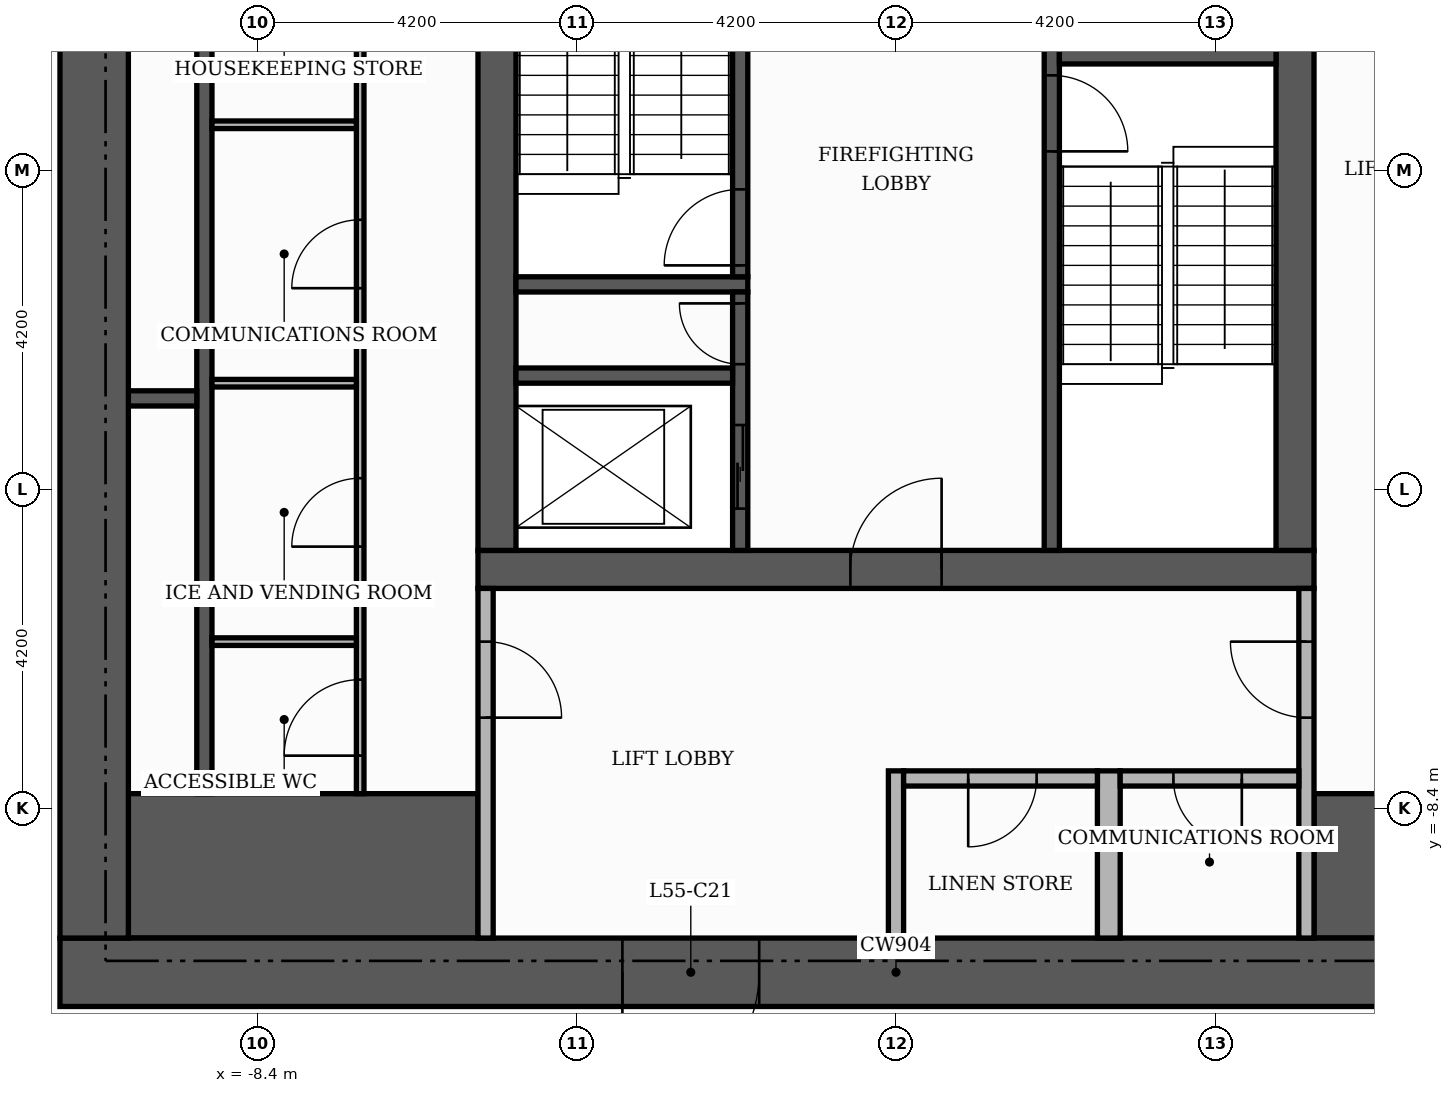
"""IFC4 building model, lengths in metres.
Left out: names, types, materials, properties, quantities, classifications, styles, units other than length and angle.
Written with IfcOpenShell. Run it as: python <this file> out.ifc"""

import sys

from ifc_helpers import new_model, si_unit, direction, frame, frame_2d, origin, place, context, subcontext, project, spatial, rectangle, extrude, element, fill, save


model = new_model("IFC4")
c1 = context("Model", 3, precision=1e-05, world=origin(), true_north=direction((0.0, 1.0)))
c2 = subcontext(c1, "Body", "Model", "MODEL_VIEW")
j1 = project(units=[si_unit("LENGTHUNIT", "METRE"), si_unit("PLANEANGLEUNIT", "RADIAN")], contexts=[c1])
p1 = place(None, origin())
s1 = spatial("IfcSite", under=j1, at=p1, CompositionType="ELEMENT")
p2 = place(p1, origin())
s2 = spatial("IfcBuilding", under=s1, at=p2, CompositionType="ELEMENT")
p3 = place(p2, frame((0.0, 0.0, 231.3)))
s3 = spatial("IfcBuildingStorey", under=s2, at=p3, CompositionType="ELEMENT", Elevation=231.3)
p4 = place(p3, frame((-5.5, -5.25, 0.0), z_axis=(0.0, 0.0, 1.0), x_axis=(1.0, 0.0, 0.0)))
e1 = element("IfcWall", 1, at=p4, inside=s3, PredefinedType="SHEAR", context=c2, shape_type="SweptSolid", body=[
    extrude(rectangle(XDim=11.0, YDim=0.5, at=frame_2d((5.5, 0.0))), origin(), (0.0, 0.0, 1.0), 3.4),
])
p5 = place(p4, frame((4.9, 0.0, 0.0)))
e2 = element("IfcOpeningElement", 2, at=p5, cuts=e1, PredefinedType="OPENING", context=c2, shape_type="SweptSolid", body=[
    extrude(rectangle(XDim=1.2, YDim=2.1, at=frame_2d((0.6, 1.05))), frame((0.0, 0.26, 0.0), z_axis=(0.0, -1.0, 0.0), x_axis=(1.0, 0.0, 0.0)), (0.0, 0.0, 1.0), 0.52),
])
for number, where, z_axis, x_axis in (
    (3, (-5.25, -5.0, 0.0), (0.0, 0.0, 1.0), (0.0, 1.0, 0.0)),
    (4, (5.25, -5.0, 0.0), (0.0, 0.0, 1.0), (0.0, 1.0, 0.0)),
):
    element("IfcWall", number, at=place(p3, frame(where, z_axis=z_axis, x_axis=x_axis)), inside=s3, PredefinedType="SHEAR", context=c2, shape_type="SweptSolid", body=[
        extrude(rectangle(XDim=10.5, YDim=0.5, at=frame_2d((5.25, 0.0))), origin(), (0.0, 0.0, 1.0), 3.4),
    ])
for number, where, z_axis, x_axis in (
    (5, (-10.1, -9.15, 0.0), (0.0, 0.0, 1.0), (1.0, 0.0, 0.0)),
    (6, (5.5, -9.15, 0.0), (0.0, 0.0, 1.0), (1.0, 0.0, 0.0)),
):
    element("IfcWall", number, at=place(p3, frame(where, z_axis=z_axis, x_axis=x_axis)), inside=s3, PredefinedType="SHEAR", context=c2, shape_type="SweptSolid", body=[
        extrude(rectangle(XDim=4.6, YDim=1.9, at=frame_2d((2.3, 0.0))), origin(), (0.0, 0.0, 1.0), 3.4),
    ])
p6 = place(p3, frame((2.05, -5.0, 0.0), z_axis=(0.0, 0.0, 1.0), x_axis=(0.0, 1.0, 0.0)))
e7 = element("IfcWall", 7, at=p6, inside=s3, PredefinedType="SHEAR", context=c2, shape_type="SweptSolid", body=[
    extrude(rectangle(XDim=6.6, YDim=0.2, at=frame_2d((3.3, 0.0))), origin(), (0.0, 0.0, 1.0), 3.4),
])
p7 = place(p6, frame((5.25, 0.0, 0.0)))
e8 = element("IfcOpeningElement", 8, at=p7, cuts=e7, PredefinedType="OPENING", context=c2, shape_type="SweptSolid", body=[
    extrude(rectangle(XDim=1.0, YDim=2.1, at=frame_2d((0.5, 1.05))), frame((0.0, 0.11, 0.0), z_axis=(0.0, -1.0, 0.0), x_axis=(1.0, 0.0, 0.0)), (0.0, 0.0, 1.0), 0.22),
])
p8 = place(p3, frame((-5.0, -1.5, 0.0), z_axis=(0.0, 0.0, 1.0), x_axis=(1.0, 0.0, 0.0)))
e9 = element("IfcWall", 9, at=p8, inside=s3, PredefinedType="SHEAR", context=c2, shape_type="SweptSolid", body=[
    extrude(rectangle(XDim=3.05, YDim=0.2, at=frame_2d((1.525, 0.0))), origin(), (0.0, 0.0, 1.0), 3.4),
])
p9 = place(p3, frame((-2.05, -1.4, 0.0), z_axis=(0.0, 0.0, 1.0), x_axis=(0.0, 1.0, 0.0)))
e10 = element("IfcWall", 10, at=p9, inside=s3, PredefinedType="SHEAR", context=c2, shape_type="SweptSolid", body=[
    extrude(rectangle(XDim=6.4, YDim=0.2, at=frame_2d((3.2, 0.0))), origin(), (0.0, 0.0, 1.0), 3.4),
])
p10 = place(p9, frame((0.15, 0.0, 0.0)))
e11 = element("IfcOpeningElement", 11, at=p10, cuts=e10, PredefinedType="OPENING", context=c2, shape_type="SweptSolid", body=[
    extrude(rectangle(XDim=1.0, YDim=2.1, at=frame_2d((0.5, 1.05))), frame((0.0, 0.11, 0.0), z_axis=(0.0, -1.0, 0.0), x_axis=(1.0, 0.0, 0.0)), (0.0, 0.0, 1.0), 0.22),
])
p11 = place(p3, frame((2.15, 1.5, 0.0), z_axis=(0.0, 0.0, 1.0), x_axis=(1.0, 0.0, 0.0)))
e12 = element("IfcWall", 12, at=p11, inside=s3, PredefinedType="SHEAR", context=c2, shape_type="SweptSolid", body=[
    extrude(rectangle(XDim=2.85, YDim=0.2, at=frame_2d((1.425, 0.0))), origin(), (0.0, 0.0, 1.0), 3.4),
])
p12 = place(p3, frame((-9.1, -8.2, 0.0), z_axis=(0.0, 0.0, 1.0), x_axis=(0.0, 1.0, 0.0)))
e13 = element("IfcWall", 13, at=p12, inside=s3, PredefinedType="SHEAR", context=c2, shape_type="SweptSolid", body=[
    extrude(rectangle(XDim=16.4, YDim=0.2, at=frame_2d((8.2, 0.0))), origin(), (0.0, 0.0, 1.0), 3.4),
])
p13 = place(p3, frame((-2.05, -5.0, 0.0), z_axis=(0.0, 0.0, 1.0), x_axis=(0.0, 1.0, 0.0)))
e14 = element("IfcWall", 14, at=p13, inside=s3, PredefinedType="SHEAR", context=c2, shape_type="SweptSolid", body=[
    extrude(rectangle(XDim=3.4, YDim=0.2, at=frame_2d((1.7, 0.0))), origin(), (0.0, 0.0, 1.0), 3.4),
])
p14 = place(p13, frame((0.55, 0.0, 0.0)))
e15 = element("IfcOpeningElement", 15, at=p14, cuts=e14, PredefinedType="OPENING", context=c2, shape_type="SweptSolid", body=[
    extrude(rectangle(XDim=1.1, YDim=2.1, at=frame_2d((0.55, 1.05))), frame((0.0, 0.11, 0.0), z_axis=(0.0, -1.0, 0.0), x_axis=(1.0, 0.0, 0.0)), (0.0, 0.0, 1.0), 0.22),
])
p15 = place(p13, frame((2.45, 0.0, 0.0)))
e16 = element("IfcOpeningElement", 16, at=p15, cuts=e14, PredefinedType="OPENING", context=c2, shape_type="SweptSolid", body=[
    extrude(rectangle(XDim=0.8, YDim=2.1, at=frame_2d((0.4, 1.05))), frame((0.0, 0.11, 0.0), z_axis=(0.0, -1.0, 0.0), x_axis=(1.0, 0.0, 0.0)), (0.0, 0.0, 1.0), 0.22),
])
p16 = place(p3, frame((-10.1, -3.0, 0.0), z_axis=(0.0, 0.0, 1.0), x_axis=(1.0, 0.0, 0.0)))
e17 = element("IfcWall", 17, at=p16, inside=s3, PredefinedType="SHEAR", context=c2, shape_type="SweptSolid", body=[
    extrude(rectangle(XDim=0.9, YDim=0.2, at=frame_2d((0.45, 0.0))), origin(), (0.0, 0.0, 1.0), 3.4),
])
p17 = place(p3, frame((-5.0, -2.7, 0.0), z_axis=(0.0, 0.0, 1.0), x_axis=(1.0, 0.0, 0.0)))
e18 = element("IfcWall", 18, at=p17, inside=s3, PredefinedType="SHEAR", context=c2, shape_type="SweptSolid", body=[
    extrude(rectangle(XDim=2.85, YDim=0.2, at=frame_2d((1.425, 0.0))), origin(), (0.0, 0.0, 1.0), 3.4),
])
p18 = place(p3, frame((-11.0, -10.55, 0.0), z_axis=(0.0, 0.0, 1.0), x_axis=(1.0, 0.0, 0.0)))
e19 = element("IfcWall", 19, at=p18, inside=s3, PredefinedType="SHEAR", context=c2, shape_type="SweptSolid", body=[
    extrude(rectangle(XDim=22.0, YDim=0.9, at=frame_2d((11.0, 0.0))), origin(), (0.0, 0.0, 1.0), 3.4),
])
p19 = place(p18, frame((7.4, 0.0, 0.0)))
e20 = element("IfcOpeningElement", 20, at=p19, cuts=e19, PredefinedType="OPENING", context=c2, shape_type="SweptSolid", body=[
    extrude(rectangle(XDim=1.8, YDim=2.2, at=frame_2d((0.9, 1.1))), frame((0.0, 0.46, 0.0), z_axis=(0.0, -1.0, 0.0), x_axis=(1.0, 0.0, 0.0)), (0.0, 0.0, 1.0), 0.92),
])
p20 = place(p3, frame((-10.55, -10.1, 0.0), z_axis=(0.0, 0.0, 1.0), x_axis=(0.0, 1.0, 0.0)))
e21 = element("IfcWall", 21, at=p20, inside=s3, PredefinedType="SHEAR", context=c2, shape_type="SweptSolid", body=[
    extrude(rectangle(XDim=20.2, YDim=0.9, at=frame_2d((10.1, 0.0))), origin(), (0.0, 0.0, 1.0), 3.4),
])
p21 = place(p3, frame((-5.4, -10.1, 0.0), z_axis=(0.0, 0.0, 1.0), x_axis=(0.0, 1.0, 0.0)))
e22 = element("IfcWall", 22, at=p21, inside=s3, PredefinedType="PARTITIONING", context=c2, shape_type="SweptSolid", body=[
    extrude(rectangle(XDim=4.6, YDim=0.2, at=frame_2d((2.3, 0.0))), origin(), (0.0, 0.0, 1.0), 3.4),
])
p22 = place(p21, frame((2.9, 0.0, 0.0)))
e23 = element("IfcOpeningElement", 23, at=p22, cuts=e22, PredefinedType="OPENING", context=c2, shape_type="SweptSolid", body=[
    extrude(rectangle(XDim=1.0, YDim=2.1, at=frame_2d((0.5, 1.05))), frame((0.0, 0.11, 0.0), z_axis=(0.0, -1.0, 0.0), x_axis=(1.0, 0.0, 0.0)), (0.0, 0.0, 1.0), 0.22),
])
p23 = place(p3, frame((0.0, -10.1, 0.0), z_axis=(0.0, 0.0, 1.0), x_axis=(0.0, 1.0, 0.0)))
e24 = element("IfcWall", 24, at=p23, inside=s3, PredefinedType="PARTITIONING", context=c2, shape_type="SweptSolid", body=[
    extrude(rectangle(XDim=2.2, YDim=0.2, at=frame_2d((1.1, 0.0))), origin(), (0.0, 0.0, 1.0), 3.4),
])
p24 = place(p3, frame((2.8, -10.1, 0.0), z_axis=(0.0, 0.0, 1.0), x_axis=(0.0, 1.0, 0.0)))
e25 = element("IfcWall", 25, at=p24, inside=s3, PredefinedType="PARTITIONING", context=c2, shape_type="SweptSolid", body=[
    extrude(rectangle(XDim=2.2, YDim=0.3, at=frame_2d((1.1, 0.0))), origin(), (0.0, 0.0, 1.0), 3.4),
])
p25 = place(p3, frame((5.4, -10.1, 0.0), z_axis=(0.0, 0.0, 1.0), x_axis=(0.0, 1.0, 0.0)))
e26 = element("IfcWall", 26, at=p25, inside=s3, PredefinedType="PARTITIONING", context=c2, shape_type="SweptSolid", body=[
    extrude(rectangle(XDim=4.6, YDim=0.2, at=frame_2d((2.3, 0.0))), origin(), (0.0, 0.0, 1.0), 3.4),
])
p26 = place(p25, frame((2.9, 0.0, 0.0)))
e27 = element("IfcOpeningElement", 27, at=p26, cuts=e26, PredefinedType="OPENING", context=c2, shape_type="SweptSolid", body=[
    extrude(rectangle(XDim=1.0, YDim=2.1, at=frame_2d((0.5, 1.05))), frame((0.0, 0.11, 0.0), z_axis=(0.0, -1.0, 0.0), x_axis=(1.0, 0.0, 0.0)), (0.0, 0.0, 1.0), 0.22),
])
p27 = place(p3, frame((-7.05, -8.2, 0.0), z_axis=(0.0, 0.0, 1.0), x_axis=(0.0, 1.0, 0.0)))
e28 = element("IfcWall", 28, at=p27, inside=s3, PredefinedType="PARTITIONING", context=c2, shape_type="SweptSolid", body=[
    extrude(rectangle(XDim=16.4, YDim=0.1, at=frame_2d((8.2, 0.0))), origin(), (0.0, 0.0, 1.0), 3.4),
])
p28 = place(p27, frame((0.5, 0.0, 0.0)))
e29 = element("IfcOpeningElement", 29, at=p28, cuts=e28, PredefinedType="OPENING", context=c2, shape_type="SweptSolid", body=[
    extrude(rectangle(XDim=1.0, YDim=2.1, at=frame_2d((0.5, 1.05))), frame((0.0, 0.06, 0.0), z_axis=(0.0, -1.0, 0.0), x_axis=(1.0, 0.0, 0.0)), (0.0, 0.0, 1.0), 0.12),
])
p29 = place(p27, frame((3.25, 0.0, 0.0)))
e30 = element("IfcOpeningElement", 30, at=p29, cuts=e28, PredefinedType="OPENING", context=c2, shape_type="SweptSolid", body=[
    extrude(rectangle(XDim=0.9, YDim=2.1, at=frame_2d((0.45, 1.05))), frame((0.0, 0.06, 0.0), z_axis=(0.0, -1.0, 0.0), x_axis=(1.0, 0.0, 0.0)), (0.0, 0.0, 1.0), 0.12),
])
p30 = place(p27, frame((6.65, 0.0, 0.0)))
e31 = element("IfcOpeningElement", 31, at=p30, cuts=e28, PredefinedType="OPENING", context=c2, shape_type="SweptSolid", body=[
    extrude(rectangle(XDim=0.9, YDim=2.1, at=frame_2d((0.45, 1.05))), frame((0.0, 0.06, 0.0), z_axis=(0.0, -1.0, 0.0), x_axis=(1.0, 0.0, 0.0)), (0.0, 0.0, 1.0), 0.12),
])
p31 = place(p27, frame((10.15, 0.0, 0.0)))
e32 = element("IfcOpeningElement", 32, at=p31, cuts=e28, PredefinedType="OPENING", context=c2, shape_type="SweptSolid", body=[
    extrude(rectangle(XDim=0.9, YDim=2.1, at=frame_2d((0.45, 1.05))), frame((0.0, 0.06, 0.0), z_axis=(0.0, -1.0, 0.0), x_axis=(1.0, 0.0, 0.0)), (0.0, 0.0, 1.0), 0.12),
])
p32 = place(p27, frame((12.95, 0.0, 0.0)))
e33 = element("IfcOpeningElement", 33, at=p32, cuts=e28, PredefinedType="OPENING", context=c2, shape_type="SweptSolid", body=[
    extrude(rectangle(XDim=0.9, YDim=2.1, at=frame_2d((0.45, 1.05))), frame((0.0, 0.06, 0.0), z_axis=(0.0, -1.0, 0.0), x_axis=(1.0, 0.0, 0.0)), (0.0, 0.0, 1.0), 0.12),
])
p33 = place(p27, frame((14.95, 0.0, 0.0)))
e34 = element("IfcOpeningElement", 34, at=p33, cuts=e28, PredefinedType="OPENING", context=c2, shape_type="SweptSolid", body=[
    extrude(rectangle(XDim=0.9, YDim=2.1, at=frame_2d((0.45, 1.05))), frame((0.0, 0.06, 0.0), z_axis=(0.0, -1.0, 0.0), x_axis=(1.0, 0.0, 0.0)), (0.0, 0.0, 1.0), 0.12),
])
p34 = place(p3, frame((0.1, -8.0, 0.0), z_axis=(0.0, 0.0, 1.0), x_axis=(1.0, 0.0, 0.0)))
e35 = element("IfcWall", 35, at=p34, inside=s3, PredefinedType="PARTITIONING", context=c2, shape_type="SweptSolid", body=[
    extrude(rectangle(XDim=2.55, YDim=0.2, at=frame_2d((1.275, 0.0))), origin(), (0.0, 0.0, 1.0), 3.4),
])
p35 = place(p34, frame((0.85, 0.0, 0.0)))
e36 = element("IfcOpeningElement", 36, at=p35, cuts=e35, PredefinedType="OPENING", context=c2, shape_type="SweptSolid", body=[
    extrude(rectangle(XDim=0.9, YDim=2.1, at=frame_2d((0.45, 1.05))), frame((0.0, 0.11, 0.0), z_axis=(0.0, -1.0, 0.0), x_axis=(1.0, 0.0, 0.0)), (0.0, 0.0, 1.0), 0.22),
])
p36 = place(p3, frame((2.95, -8.0, 0.0), z_axis=(0.0, 0.0, 1.0), x_axis=(1.0, 0.0, 0.0)))
e37 = element("IfcWall", 37, at=p36, inside=s3, PredefinedType="PARTITIONING", context=c2, shape_type="SweptSolid", body=[
    extrude(rectangle(XDim=2.35, YDim=0.2, at=frame_2d((1.175, 0.0))), origin(), (0.0, 0.0, 1.0), 3.4),
])
p37 = place(p36, frame((0.7, 0.0, 0.0)))
e38 = element("IfcOpeningElement", 38, at=p37, cuts=e37, PredefinedType="OPENING", context=c2, shape_type="SweptSolid", body=[
    extrude(rectangle(XDim=0.9, YDim=2.1, at=frame_2d((0.45, 1.05))), frame((0.0, 0.11, 0.0), z_axis=(0.0, -1.0, 0.0), x_axis=(1.0, 0.0, 0.0)), (0.0, 0.0, 1.0), 0.22),
])
for number, where, z_axis, x_axis in (
    (39, (-9.0, -6.2, 0.0), (0.0, 0.0, 1.0), (1.0, 0.0, 0.0)),
    (40, (-9.0, -2.8, 0.0), (0.0, 0.0, 1.0), (1.0, 0.0, 0.0)),
    (41, (-9.0, 0.6, 0.0), (0.0, 0.0, 1.0), (1.0, 0.0, 0.0)),
):
    element("IfcWall", number, at=place(p3, frame(where, z_axis=z_axis, x_axis=x_axis)), inside=s3, PredefinedType="PARTITIONING", context=c2, shape_type="SweptSolid", body=[
        extrude(rectangle(XDim=1.9, YDim=0.1, at=frame_2d((0.95, 0.0))), origin(), (0.0, 0.0, 1.0), 3.4),
    ])
p38 = place(p14, origin())
e42 = element("IfcDoor", 42, at=p38, inside=s3, OperationType="SLIDING_TO_LEFT", PredefinedType="DOOR", context=c2, shape_type="SweptSolid", body=[
    extrude(rectangle(XDim=1.1, YDim=2.1, at=frame_2d((0.55, 1.05))), frame((0.0, 0.025, 0.0), z_axis=(0.0, -1.0, 0.0), x_axis=(1.0, 0.0, 0.0)), (0.0, 0.0, 1.0), 0.05),
])
fill(e15, e42)
p39 = place(p10, origin())
e43 = element("IfcDoor", 43, at=p39, inside=s3, OperationType="SINGLE_SWING_LEFT", PredefinedType="DOOR", context=c2, shape_type="SweptSolid", body=[
    extrude(rectangle(XDim=1.0, YDim=2.1, at=frame_2d((0.5, 1.05))), frame((0.0, 0.025, 0.0), z_axis=(0.0, -1.0, 0.0), x_axis=(1.0, 0.0, 0.0)), (0.0, 0.0, 1.0), 0.05),
])
fill(e11, e43)
p40 = place(p7, frame((1.0, 0.0, 0.0), z_axis=(0.0, 0.0, 1.0), x_axis=(-1.0, 0.0, 0.0)))
e44 = element("IfcDoor", 44, at=p40, inside=s3, OperationType="SINGLE_SWING_LEFT", PredefinedType="DOOR", context=c2, shape_type="SweptSolid", body=[
    extrude(rectangle(XDim=1.0, YDim=2.1, at=frame_2d((0.5, 1.05))), frame((0.0, 0.025, 0.0), z_axis=(0.0, -1.0, 0.0), x_axis=(1.0, 0.0, 0.0)), (0.0, 0.0, 1.0), 0.05),
])
fill(e8, e44)
p41 = place(p15, origin())
e45 = element("IfcDoor", 45, at=p41, inside=s3, OperationType="SINGLE_SWING_RIGHT", PredefinedType="DOOR", context=c2, shape_type="SweptSolid", body=[
    extrude(rectangle(XDim=0.8, YDim=2.1, at=frame_2d((0.4, 1.05))), frame((0.0, 0.025, 0.0), z_axis=(0.0, -1.0, 0.0), x_axis=(1.0, 0.0, 0.0)), (0.0, 0.0, 1.0), 0.05),
])
fill(e16, e45)
p42 = place(p5, origin())
e46 = element("IfcDoor", 46, at=p42, inside=s3, OperationType="SINGLE_SWING_RIGHT", PredefinedType="DOOR", context=c2, shape_type="SweptSolid", body=[
    extrude(rectangle(XDim=1.2, YDim=2.1, at=frame_2d((0.6, 1.05))), frame((0.0, 0.025, 0.0), z_axis=(0.0, -1.0, 0.0), x_axis=(1.0, 0.0, 0.0)), (0.0, 0.0, 1.0), 0.05),
])
fill(e2, e46)
p43 = place(p22, frame((1.0, 0.0, 0.0), z_axis=(0.0, 0.0, 1.0), x_axis=(-1.0, 0.0, 0.0)))
e47 = element("IfcDoor", 47, at=p43, inside=s3, OperationType="SINGLE_SWING_LEFT", PredefinedType="DOOR", context=c2, shape_type="SweptSolid", body=[
    extrude(rectangle(XDim=1.0, YDim=2.1, at=frame_2d((0.5, 1.05))), frame((0.0, 0.025, 0.0), z_axis=(0.0, -1.0, 0.0), x_axis=(1.0, 0.0, 0.0)), (0.0, 0.0, 1.0), 0.05),
])
fill(e23, e47)
p44 = place(p26, origin())
e48 = element("IfcDoor", 48, at=p44, inside=s3, OperationType="SINGLE_SWING_RIGHT", PredefinedType="DOOR", context=c2, shape_type="SweptSolid", body=[
    extrude(rectangle(XDim=1.0, YDim=2.1, at=frame_2d((0.5, 1.05))), frame((0.0, 0.025, 0.0), z_axis=(0.0, -1.0, 0.0), x_axis=(1.0, 0.0, 0.0)), (0.0, 0.0, 1.0), 0.05),
])
fill(e27, e48)
p45 = place(p19, frame((1.8, 0.0, 0.0), z_axis=(0.0, 0.0, 1.0), x_axis=(-1.0, 0.0, 0.0)))
e49 = element("IfcDoor", 49, at=p45, inside=s3, OperationType="DOUBLE_DOOR_SINGLE_SWING", PredefinedType="DOOR", context=c2, shape_type="SweptSolid", body=[
    extrude(rectangle(XDim=1.8, YDim=2.2, at=frame_2d((0.9, 1.1))), frame((0.0, 0.025, 0.0), z_axis=(0.0, -1.0, 0.0), x_axis=(1.0, 0.0, 0.0)), (0.0, 0.0, 1.0), 0.05),
])
fill(e20, e49)
p46 = place(p35, frame((0.9, 0.0, 0.0), z_axis=(0.0, 0.0, 1.0), x_axis=(-1.0, 0.0, 0.0)))
e50 = element("IfcDoor", 50, at=p46, inside=s3, OperationType="SINGLE_SWING_LEFT", PredefinedType="DOOR", context=c2, shape_type="SweptSolid", body=[
    extrude(rectangle(XDim=0.9, YDim=2.1, at=frame_2d((0.45, 1.05))), frame((0.0, 0.025, 0.0), z_axis=(0.0, -1.0, 0.0), x_axis=(1.0, 0.0, 0.0)), (0.0, 0.0, 1.0), 0.05),
])
fill(e36, e50)
p47 = place(p37, frame((0.9, 0.0, 0.0), z_axis=(0.0, 0.0, 1.0), x_axis=(-1.0, 0.0, 0.0)))
e51 = element("IfcDoor", 51, at=p47, inside=s3, OperationType="SINGLE_SWING_RIGHT", PredefinedType="DOOR", context=c2, shape_type="SweptSolid", body=[
    extrude(rectangle(XDim=0.9, YDim=2.1, at=frame_2d((0.45, 1.05))), frame((0.0, 0.025, 0.0), z_axis=(0.0, -1.0, 0.0), x_axis=(1.0, 0.0, 0.0)), (0.0, 0.0, 1.0), 0.05),
])
fill(e38, e51)
p48 = place(p28, origin())
e52 = element("IfcDoor", 52, at=p48, inside=s3, OperationType="SINGLE_SWING_LEFT", PredefinedType="DOOR", context=c2, shape_type="SweptSolid", body=[
    extrude(rectangle(XDim=1.0, YDim=2.1, at=frame_2d((0.5, 1.05))), frame((0.0, 0.025, 0.0), z_axis=(0.0, -1.0, 0.0), x_axis=(1.0, 0.0, 0.0)), (0.0, 0.0, 1.0), 0.05),
])
fill(e29, e52)
p49 = place(p29, origin())
e53 = element("IfcDoor", 53, at=p49, inside=s3, OperationType="SINGLE_SWING_LEFT", PredefinedType="DOOR", context=c2, shape_type="SweptSolid", body=[
    extrude(rectangle(XDim=0.9, YDim=2.1, at=frame_2d((0.45, 1.05))), frame((0.0, 0.025, 0.0), z_axis=(0.0, -1.0, 0.0), x_axis=(1.0, 0.0, 0.0)), (0.0, 0.0, 1.0), 0.05),
])
fill(e30, e53)
p50 = place(p30, origin())
e54 = element("IfcDoor", 54, at=p50, inside=s3, OperationType="SINGLE_SWING_LEFT", PredefinedType="DOOR", context=c2, shape_type="SweptSolid", body=[
    extrude(rectangle(XDim=0.9, YDim=2.1, at=frame_2d((0.45, 1.05))), frame((0.0, 0.025, 0.0), z_axis=(0.0, -1.0, 0.0), x_axis=(1.0, 0.0, 0.0)), (0.0, 0.0, 1.0), 0.05),
])
fill(e31, e54)
save(model, sys.argv[1])
